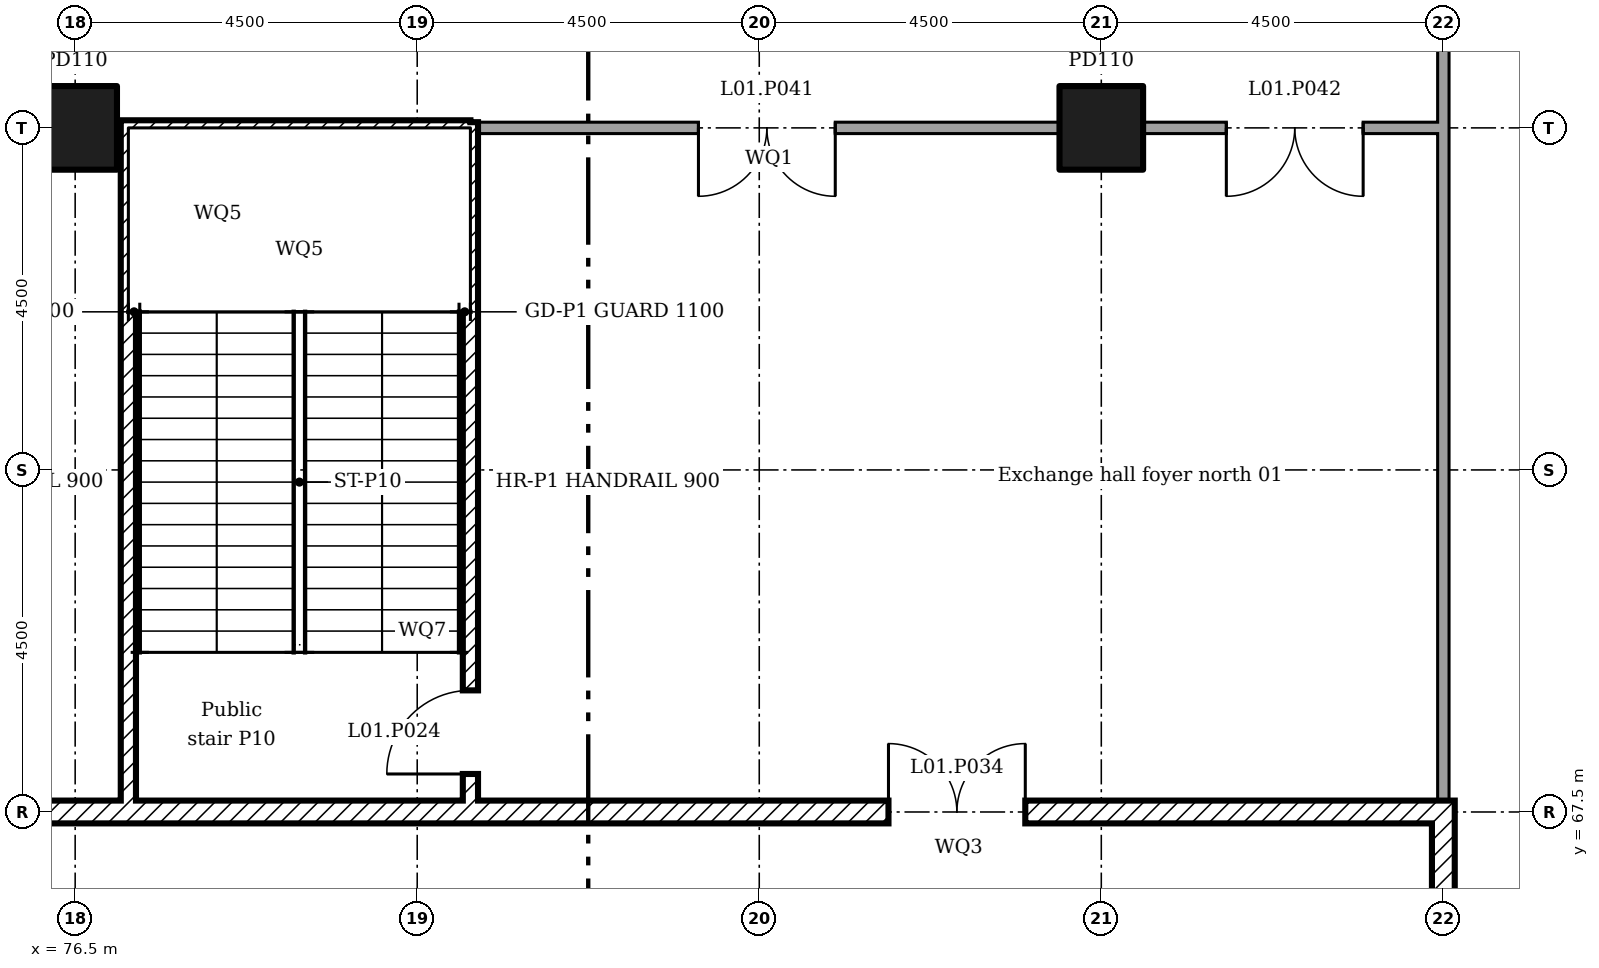
"""IFC4 building model, lengths in metres.
Left out: names, types, materials, properties, quantities, classifications, styles, units other than length and angle.
Written with IfcOpenShell. Run it as: python <this file> out.ifc"""

import sys

from ifc_helpers import new_model, si_unit, direction, frame, frame_2d, origin, origin_2d, place, context, subcontext, project, spatial, rectangle, extrude, element, fill, save


model = new_model("IFC4")
c1 = context("Model", 3, precision=1e-05, world=origin(), true_north=direction((0.0, 1.0)))
c2 = subcontext(c1, "Body", "Model", "MODEL_VIEW")
j1 = project(units=[si_unit("LENGTHUNIT", "METRE"), si_unit("PLANEANGLEUNIT", "RADIAN")], contexts=[c1])
p1 = place(None, origin())
s1 = spatial("IfcSite", under=j1, at=p1, CompositionType="ELEMENT")
p2 = place(p1, origin())
s2 = spatial("IfcBuilding", under=s1, at=p2, CompositionType="ELEMENT")
p3 = place(p2, frame((0.0, 0.0, 6.0)))
s3 = spatial("IfcBuildingStorey", under=s2, at=p3, CompositionType="ELEMENT", Elevation=6.0)
for number, where in (
    (1, (76.5, 76.5, 0.0)),
    (2, (90.0, 76.5, 0.0)),
):
    element("IfcColumn", number, at=place(p3, frame(where)), inside=s3, PredefinedType="COLUMN", context=c2, shape_type="SweptSolid", body=[
        extrude(rectangle(XDim=1.1, YDim=1.1, at=origin_2d()), origin(), (0.0, 0.0, 1.0), 5.5),
    ])
p4 = place(p3, frame((81.6, 67.5, 0.0)))
e3 = element("IfcWall", 3, at=p4, inside=s3, PredefinedType="SOLIDWALL", context=c2, shape_type="SweptSolid", body=[
    extrude(rectangle(XDim=13.05, YDim=0.3, at=frame_2d((6.525, 0.0))), origin(), (0.0, 0.0, 1.0), 5.5),
])
p5 = place(p4, frame((5.6, 0.0, 0.0)))
e4 = element("IfcOpeningElement", 4, at=p5, cuts=e3, PredefinedType="OPENING", context=c2, shape_type="SweptSolid", body=[
    extrude(rectangle(XDim=1.8, YDim=2.1, at=frame_2d((0.9, 1.05))), frame((0.0, 0.16, 0.0), z_axis=(0.0, -1.0, 0.0), x_axis=(1.0, 0.0, 0.0)), (0.0, 0.0, 1.0), 0.32),
])
p6 = place(p3, frame((94.5, 58.425, 0.0), z_axis=(0.0, 0.0, 1.0), x_axis=(0.0, 1.0, 0.0)))
e5 = element("IfcWall", 5, at=p6, inside=s3, PredefinedType="SOLIDWALL", context=c2, shape_type="SweptSolid", body=[
    extrude(rectangle(XDim=8.925, YDim=0.3, at=frame_2d((4.462, 0.0))), origin(), (0.0, 0.0, 1.0), 10.05),
])
p7 = place(p3, frame((73.295, 67.5, 0.0)))
e6 = element("IfcWall", 6, at=p7, inside=s3, PredefinedType="SOLIDWALL", context=c2, shape_type="SweptSolid", body=[
    extrude(rectangle(XDim=4.005, YDim=0.3, at=frame_2d((2.002, 0.0))), origin(), (0.0, 0.0, 1.0), 5.5),
])
p8 = place(p7, frame((1.35, 0.0, 0.0)))
e7 = element("IfcOpeningElement", 7, at=p8, cuts=e6, PredefinedType="OPENING", context=c2, shape_type="SweptSolid", body=[
    extrude(rectangle(XDim=1.2, YDim=2.1, at=frame_2d((0.6, 1.05))), frame((0.0, 0.16, 0.0), z_axis=(0.0, -1.0, 0.0), x_axis=(1.0, 0.0, 0.0)), (0.0, 0.0, 1.0), 0.32),
])
p9 = place(p3, frame((77.2, 67.5, 0.0)))
e8 = element("IfcWall", 8, at=p9, inside=s3, PredefinedType="SOLIDWALL", context=c2, shape_type="SweptSolid", body=[
    extrude(rectangle(XDim=4.5, YDim=0.3, at=frame_2d((2.25, 0.0))), origin(), (0.0, 0.0, 1.0), 5.5),
])
p10 = place(p3, frame((81.8, 76.5, 0.0)))
e9 = element("IfcWall", 9, at=p10, inside=s3, PredefinedType="PARTITIONING", context=c2, shape_type="SweptSolid", body=[
    extrude(rectangle(XDim=7.655, YDim=0.15, at=frame_2d((3.828, 0.0))), origin(), (0.0, 0.0, 1.0), 5.05),
])
p11 = place(p10, frame((2.9, 0.0, 0.0)))
e10 = element("IfcOpeningElement", 10, at=p11, cuts=e9, PredefinedType="OPENING", context=c2, shape_type="SweptSolid", body=[
    extrude(rectangle(XDim=1.8, YDim=2.1, at=frame_2d((0.9, 1.05))), frame((0.0, 0.085, 0.0), z_axis=(0.0, -1.0, 0.0), x_axis=(1.0, 0.0, 0.0)), (0.0, 0.0, 1.0), 0.17),
])
p12 = place(p3, frame((90.545, 76.5, 0.0)))
e11 = element("IfcWall", 11, at=p12, inside=s3, PredefinedType="PARTITIONING", context=c2, shape_type="SweptSolid", body=[
    extrude(rectangle(XDim=4.03, YDim=0.15, at=frame_2d((2.015, 0.0))), origin(), (0.0, 0.0, 1.0), 5.05),
])
p13 = place(p12, frame((1.1, 0.0, 0.0)))
e12 = element("IfcOpeningElement", 12, at=p13, cuts=e11, PredefinedType="OPENING", context=c2, shape_type="SweptSolid", body=[
    extrude(rectangle(XDim=1.8, YDim=2.1, at=frame_2d((0.9, 1.05))), frame((0.0, 0.085, 0.0), z_axis=(0.0, -1.0, 0.0), x_axis=(1.0, 0.0, 0.0)), (0.0, 0.0, 1.0), 0.17),
])
p14 = place(p3, frame((94.5, 67.5, 0.0), z_axis=(0.0, 0.0, 1.0), x_axis=(0.0, 1.0, 0.0)))
e13 = element("IfcWall", 13, at=p14, inside=s3, PredefinedType="PARTITIONING", context=c2, shape_type="SweptSolid", body=[
    extrude(rectangle(XDim=8.925, YDim=0.15, at=frame_2d((4.462, 0.0))), origin(), (0.0, 0.0, 1.0), 5.05),
])
p15 = place(p3, frame((81.7, 67.65, 0.0), z_axis=(0.0, 0.0, 1.0), x_axis=(0.0, 1.0, 0.0)))
e14 = element("IfcWall", 14, at=p15, inside=s3, PredefinedType="SOLIDWALL", context=c2, shape_type="SweptSolid", body=[
    extrude(rectangle(XDim=8.925, YDim=0.2, at=frame_2d((4.462, 0.0))), origin(), (0.0, 0.0, 1.0), 5.05),
])
p16 = place(p15, frame((0.35, 0.0, 0.0)))
e15 = element("IfcOpeningElement", 15, at=p16, cuts=e14, PredefinedType="OPENING", context=c2, shape_type="SweptSolid", body=[
    extrude(rectangle(XDim=1.1, YDim=2.1, at=frame_2d((0.55, 1.05))), frame((0.0, 0.11, 0.0), z_axis=(0.0, -1.0, 0.0), x_axis=(1.0, 0.0, 0.0)), (0.0, 0.0, 1.0), 0.22),
])
p17 = place(p3, frame((94.5, 76.5, 0.0), z_axis=(0.0, 0.0, 1.0), x_axis=(0.0, 1.0, 0.0)))
e16 = element("IfcWall", 16, at=p17, inside=s3, PredefinedType="PARTITIONING", context=c2, shape_type="SweptSolid", body=[
    extrude(rectangle(XDim=4.5, YDim=0.15, at=frame_2d((2.25, 0.0))), origin(), (0.0, 0.0, 1.0), 5.05),
])
p18 = place(p3, frame((77.1, 76.5, 0.0)))
e17 = element("IfcWall", 17, at=p18, inside=s3, PredefinedType="SOLIDWALL", context=c2, shape_type="SweptSolid", body=[
    extrude(rectangle(XDim=4.6, YDim=0.2, at=frame_2d((2.3, 0.0))), origin(), (0.0, 0.0, 1.0), 5.05),
])
p19 = place(p3, frame((77.2, 67.65, 0.0), z_axis=(0.0, 0.0, 1.0), x_axis=(0.0, 1.0, 0.0)))
e18 = element("IfcWall", 18, at=p19, inside=s3, PredefinedType="SOLIDWALL", context=c2, shape_type="SweptSolid", body=[
    extrude(rectangle(XDim=8.75, YDim=0.2, at=frame_2d((4.375, 0.0))), origin(), (0.0, 0.0, 1.0), 5.05),
])
for number, where in (
    (19, (77.3, 74.46, -3.0)),
    (20, (77.3, 75.8, -3.0)),
):
    element("IfcWall", number, at=place(p3, frame(where)), inside=s3, PredefinedType="SOLIDWALL", context=c2, shape_type="SweptSolid", body=[
        extrude(rectangle(XDim=4.3, YDim=0.2, at=frame_2d((2.15, 0.0))), origin(), (0.0, 0.0, 1.0), 5.55),
    ])
p20 = place(p16, origin())
e21 = element("IfcDoor", 21, at=p20, inside=s3, OperationType="SINGLE_SWING_RIGHT", PredefinedType="DOOR", context=c2, shape_type="SweptSolid", body=[
    extrude(rectangle(XDim=1.1, YDim=2.1, at=frame_2d((0.55, 1.05))), frame((0.0, 0.025, 0.0), z_axis=(0.0, -1.0, 0.0), x_axis=(1.0, 0.0, 0.0)), (0.0, 0.0, 1.0), 0.05),
])
fill(e15, e21)
p21 = place(p5, origin())
e22 = element("IfcDoor", 22, at=p21, inside=s3, OperationType="DOUBLE_DOOR_SINGLE_SWING", PredefinedType="DOOR", context=c2, shape_type="SweptSolid", body=[
    extrude(rectangle(XDim=1.8, YDim=2.1, at=frame_2d((0.9, 1.05))), frame((0.0, 0.025, 0.0), z_axis=(0.0, -1.0, 0.0), x_axis=(1.0, 0.0, 0.0)), (0.0, 0.0, 1.0), 0.05),
])
fill(e4, e22)
p22 = place(p11, frame((1.8, 0.0, 0.0), x_axis=(-1.0, 0.0, 0.0)))
e23 = element("IfcDoor", 23, at=p22, inside=s3, OperationType="DOUBLE_DOOR_SINGLE_SWING", PredefinedType="DOOR", context=c2, shape_type="SweptSolid", body=[
    extrude(rectangle(XDim=1.8, YDim=2.1, at=frame_2d((0.9, 1.05))), frame((0.0, 0.025, 0.0), z_axis=(0.0, -1.0, 0.0), x_axis=(1.0, 0.0, 0.0)), (0.0, 0.0, 1.0), 0.05),
])
fill(e10, e23)
p23 = place(p13, frame((1.8, 0.0, 0.0), x_axis=(-1.0, 0.0, 0.0)))
e24 = element("IfcDoor", 24, at=p23, inside=s3, OperationType="DOUBLE_DOOR_SINGLE_SWING", PredefinedType="DOOR", context=c2, shape_type="SweptSolid", body=[
    extrude(rectangle(XDim=1.8, YDim=2.1, at=frame_2d((0.9, 1.05))), frame((0.0, 0.025, 0.0), z_axis=(0.0, -1.0, 0.0), x_axis=(1.0, 0.0, 0.0)), (0.0, 0.0, 1.0), 0.05),
])
fill(e12, e24)
save(model, sys.argv[1])
